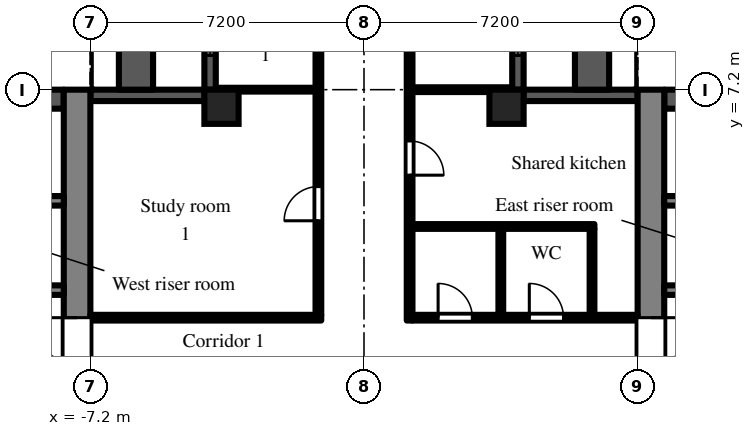
"""IFC4 building model, lengths in metres.
Left out: names, types, materials, properties, quantities, classifications, styles, units other than length and angle.
Written with IfcOpenShell. Run it as: python <this file> out.ifc"""

import sys

from ifc_helpers import new_model, si_unit, direction, frame, frame_2d, origin, origin_2d, place, context, subcontext, project, spatial, rectangle, extrude, element, fill, save


model = new_model("IFC4")
c1 = context("Model", 3, precision=1e-05, world=origin(), true_north=direction((0.0, 1.0)))
c2 = subcontext(c1, "Body", "Model", "MODEL_VIEW")
j1 = project(units=[si_unit("LENGTHUNIT", "METRE"), si_unit("PLANEANGLEUNIT", "RADIAN")], contexts=[c1])
p1 = place(None, origin())
s1 = spatial("IfcSite", under=j1, at=p1, CompositionType="ELEMENT")
p2 = place(p1, origin())
s2 = spatial("IfcBuilding", under=s1, at=p2, CompositionType="ELEMENT")
p3 = place(p2, frame((0.0, 0.0, 84.9)))
s3 = spatial("IfcBuildingStorey", under=s2, at=p3, CompositionType="ELEMENT", Elevation=84.9)
for number, where, z_axis, x_axis in (
    (1, (-3.75, 6.75, 0.0), (0.0, 0.0, 1.0), (1.0, 0.0, 0.0)),
    (2, (3.75, 6.75, 0.0), (0.0, 0.0, 1.0), (1.0, 0.0, 0.0)),
):
    element("IfcColumn", number, at=place(p3, frame(where, z_axis=z_axis, x_axis=x_axis)), inside=s3, PredefinedType="COLUMN", context=c2, shape_type="SweptSolid", body=[
        extrude(rectangle(XDim=0.9, YDim=0.9, at=origin_2d()), origin(), (0.0, 0.0, 1.0), 3.0),
    ])
p4 = place(p3, frame((7.2, 7.05, 0.0), z_axis=(0.0, 0.0, 1.0), x_axis=(-1.0, 0.0, 0.0)))
e3 = element("IfcWall", 3, at=p4, inside=s3, PredefinedType="SOLIDWALL", context=c2, shape_type="SweptSolid", body=[
    extrude(rectangle(XDim=3.0, YDim=0.3, at=frame_2d((1.5, 0.0))), origin(), (0.0, 0.0, 1.0), 2.1),
])
p5 = place(p3, frame((4.05, 7.2, 0.0), z_axis=(0.0, 0.0, 1.0), x_axis=(0.0, 1.0, 0.0)))
e4 = element("IfcWall", 4, at=p5, inside=s3, PredefinedType="SOLIDWALL", context=c2, shape_type="SweptSolid", body=[
    extrude(rectangle(XDim=7.2, YDim=0.3, at=frame_2d((3.6, 0.0))), origin(), (0.0, 0.0, 1.0), 2.1),
])
p6 = place(p5, frame((3.0, 0.0, 0.0)))
e5 = element("IfcOpeningElement", 5, at=p6, cuts=e4, PredefinedType="OPENING", context=c2, shape_type="SweptSolid", body=[
    extrude(rectangle(XDim=1.2, YDim=2.05, at=frame_2d((0.6, 1.025))), frame((0.0, 0.16, 0.0), z_axis=(0.0, -1.0, 0.0), x_axis=(1.0, 0.0, 0.0)), (0.0, 0.0, 1.0), 0.32),
])
p7 = place(p5, frame((0.9, 0.0, 0.2)))
e6 = element("IfcOpeningElement", 6, at=p7, cuts=e4, PredefinedType="OPENING", context=c2, shape_type="SweptSolid", body=[
    extrude(rectangle(XDim=1.8, YDim=1.85, at=frame_2d((0.9, 0.925))), frame((0.0, 0.16, 0.0), z_axis=(0.0, -1.0, 0.0), x_axis=(1.0, 0.0, 0.0)), (0.0, 0.0, 1.0), 0.32),
])
p8 = place(p5, frame((4.5, 0.0, 0.2)))
e7 = element("IfcOpeningElement", 7, at=p8, cuts=e4, PredefinedType="OPENING", context=c2, shape_type="SweptSolid", body=[
    extrude(rectangle(XDim=1.8, YDim=1.85, at=frame_2d((0.9, 0.925))), frame((0.0, 0.16, 0.0), z_axis=(0.0, -1.0, 0.0), x_axis=(1.0, 0.0, 0.0)), (0.0, 0.0, 1.0), 0.32),
])
p9 = place(p3, frame((-4.05, 14.4, 0.0), z_axis=(0.0, 0.0, 1.0), x_axis=(0.0, -1.0, 0.0)))
e8 = element("IfcWall", 8, at=p9, inside=s3, PredefinedType="SOLIDWALL", context=c2, shape_type="SweptSolid", body=[
    extrude(rectangle(XDim=7.2, YDim=0.3, at=frame_2d((3.6, 0.0))), origin(), (0.0, 0.0, 1.0), 2.1),
])
p10 = place(p9, frame((3.0, 0.0, 0.0)))
e9 = element("IfcOpeningElement", 9, at=p10, cuts=e8, PredefinedType="OPENING", context=c2, shape_type="SweptSolid", body=[
    extrude(rectangle(XDim=1.2, YDim=2.05, at=frame_2d((0.6, 1.025))), frame((0.0, 0.16, 0.0), z_axis=(0.0, -1.0, 0.0), x_axis=(1.0, 0.0, 0.0)), (0.0, 0.0, 1.0), 0.32),
])
p11 = place(p9, frame((0.9, 0.0, 0.2)))
e10 = element("IfcOpeningElement", 10, at=p11, cuts=e8, PredefinedType="OPENING", context=c2, shape_type="SweptSolid", body=[
    extrude(rectangle(XDim=1.8, YDim=1.85, at=frame_2d((0.9, 0.925))), frame((0.0, 0.16, 0.0), z_axis=(0.0, -1.0, 0.0), x_axis=(1.0, 0.0, 0.0)), (0.0, 0.0, 1.0), 0.32),
])
p12 = place(p9, frame((4.5, 0.0, 0.2)))
e11 = element("IfcOpeningElement", 11, at=p12, cuts=e8, PredefinedType="OPENING", context=c2, shape_type="SweptSolid", body=[
    extrude(rectangle(XDim=1.8, YDim=1.85, at=frame_2d((0.9, 0.925))), frame((0.0, 0.16, 0.0), z_axis=(0.0, -1.0, 0.0), x_axis=(1.0, 0.0, 0.0)), (0.0, 0.0, 1.0), 0.32),
])
p13 = place(p3, frame((-4.2, 7.05, 0.0), z_axis=(0.0, 0.0, 1.0), x_axis=(-1.0, 0.0, 0.0)))
e12 = element("IfcWall", 12, at=p13, inside=s3, PredefinedType="SOLIDWALL", context=c2, shape_type="SweptSolid", body=[
    extrude(rectangle(XDim=3.0, YDim=0.3, at=frame_2d((1.5, 0.0))), origin(), (0.0, 0.0, 1.0), 2.1),
])
for number, where, z_axis, x_axis in (
    (13, (6.0, 7.2, 0.0), (0.0, 0.0, 1.0), (0.0, 1.0, 0.0)),
    (14, (-6.0, 7.2, 0.0), (0.0, 0.0, 1.0), (0.0, 1.0, 0.0)),
):
    element("IfcWall", number, at=place(p3, frame(where, z_axis=z_axis, x_axis=x_axis)), inside=s3, PredefinedType="PARAPET", context=c2, shape_type="SweptSolid", body=[
        extrude(rectangle(XDim=7.2, YDim=0.9, at=frame_2d((3.6, 0.0))), origin(), (0.0, 0.0, 1.0), 0.8),
    ])
p14 = place(p3, frame((7.55, -7.2, 0.0), z_axis=(0.0, 0.0, 1.0), x_axis=(0.0, 1.0, 0.0)))
e15 = element("IfcWall", 15, at=p14, inside=s3, PredefinedType="SHEAR", context=c2, shape_type="SweptSolid", body=[
    extrude(rectangle(XDim=14.4, YDim=0.7, at=frame_2d((7.2, 0.0))), origin(), (0.0, 0.0, 1.0), 2.575),
])
p15 = place(p14, frame((6.0, 0.0, 0.0)))
e16 = element("IfcOpeningElement", 16, at=p15, cuts=e15, PredefinedType="OPENING", context=c2, shape_type="SweptSolid", body=[
    extrude(rectangle(XDim=2.4, YDim=2.2, at=frame_2d((1.2, 1.1))), frame((0.0, 0.36, 0.0), z_axis=(0.0, -1.0, 0.0), x_axis=(1.0, 0.0, 0.0)), (0.0, 0.0, 1.0), 0.72),
])
p16 = place(p3, frame((7.9, 6.95, 0.0), z_axis=(0.0, 0.0, 1.0), x_axis=(1.0, 0.0, 0.0)))
e17 = element("IfcWall", 17, at=p16, inside=s3, PredefinedType="SHEAR", context=c2, shape_type="SweptSolid", body=[
    extrude(rectangle(XDim=12.95, YDim=0.5, at=frame_2d((6.475, 0.0))), origin(), (0.0, 0.0, 1.0), 2.575),
])
p17 = place(p3, frame((7.9, 1.925, 0.0), z_axis=(0.0, 0.0, 1.0), x_axis=(1.0, 0.0, 0.0)))
e18 = element("IfcWall", 18, at=p17, inside=s3, PredefinedType="SHEAR", context=c2, shape_type="SweptSolid", body=[
    extrude(rectangle(XDim=12.95, YDim=0.25, at=frame_2d((6.475, 0.0))), origin(), (0.0, 0.0, 1.0), 2.575),
])
p18 = place(p17, frame((0.525, 0.0, 0.0)))
e19 = element("IfcOpeningElement", 19, at=p18, cuts=e18, PredefinedType="OPENING", context=c2, shape_type="SweptSolid", body=[
    extrude(rectangle(XDim=0.9, YDim=2.1, at=frame_2d((0.45, 1.05))), frame((0.0, 0.135, 0.0), z_axis=(0.0, -1.0, 0.0), x_axis=(1.0, 0.0, 0.0)), (0.0, 0.0, 1.0), 0.27),
])
p19 = place(p17, frame((2.625, 0.0, 0.0)))
e20 = element("IfcOpeningElement", 20, at=p19, cuts=e18, PredefinedType="OPENING", context=c2, shape_type="SweptSolid", body=[
    extrude(rectangle(XDim=1.1, YDim=2.1, at=frame_2d((0.55, 1.05))), frame((0.0, 0.135, 0.0), z_axis=(0.0, -1.0, 0.0), x_axis=(1.0, 0.0, 0.0)), (0.0, 0.0, 1.0), 0.27),
])
p20 = place(p17, frame((6.025, 0.0, 0.0)))
e21 = element("IfcOpeningElement", 21, at=p20, cuts=e18, PredefinedType="OPENING", context=c2, shape_type="SweptSolid", body=[
    extrude(rectangle(XDim=0.9, YDim=2.1, at=frame_2d((0.45, 1.05))), frame((0.0, 0.135, 0.0), z_axis=(0.0, -1.0, 0.0), x_axis=(1.0, 0.0, 0.0)), (0.0, 0.0, 1.0), 0.27),
])
p21 = place(p17, frame((9.325, 0.0, 0.0)))
e22 = element("IfcOpeningElement", 22, at=p21, cuts=e18, PredefinedType="OPENING", context=c2, shape_type="SweptSolid", body=[
    extrude(rectangle(XDim=0.9, YDim=2.1, at=frame_2d((0.45, 1.05))), frame((0.0, 0.135, 0.0), z_axis=(0.0, -1.0, 0.0), x_axis=(1.0, 0.0, 0.0)), (0.0, 0.0, 1.0), 0.27),
])
p22 = place(p3, frame((7.9, 4.275, 0.0), z_axis=(0.0, 0.0, 1.0), x_axis=(1.0, 0.0, 0.0)))
e23 = element("IfcWall", 23, at=p22, inside=s3, PredefinedType="SHEAR", context=c2, shape_type="SweptSolid", body=[
    extrude(rectangle(XDim=1.95, YDim=0.25, at=frame_2d((0.975, 0.0))), origin(), (0.0, 0.0, 1.0), 2.575),
])
p23 = place(p3, frame((-7.55, -7.2, 0.0), z_axis=(0.0, 0.0, 1.0), x_axis=(0.0, 1.0, 0.0)))
e24 = element("IfcWall", 24, at=p23, inside=s3, PredefinedType="SHEAR", context=c2, shape_type="SweptSolid", body=[
    extrude(rectangle(XDim=14.4, YDim=0.7, at=frame_2d((7.2, 0.0))), origin(), (0.0, 0.0, 1.0), 2.575),
])
p24 = place(p23, frame((6.0, 0.0, 0.0)))
e25 = element("IfcOpeningElement", 25, at=p24, cuts=e24, PredefinedType="OPENING", context=c2, shape_type="SweptSolid", body=[
    extrude(rectangle(XDim=2.4, YDim=2.2, at=frame_2d((1.2, 1.1))), frame((0.0, 0.36, 0.0), z_axis=(0.0, -1.0, 0.0), x_axis=(1.0, 0.0, 0.0)), (0.0, 0.0, 1.0), 0.72),
])
p25 = place(p3, frame((-7.9, 6.95, 0.0), z_axis=(0.0, 0.0, 1.0), x_axis=(-1.0, 0.0, 0.0)))
e26 = element("IfcWall", 26, at=p25, inside=s3, PredefinedType="SHEAR", context=c2, shape_type="SweptSolid", body=[
    extrude(rectangle(XDim=12.95, YDim=0.5, at=frame_2d((6.475, 0.0))), origin(), (0.0, 0.0, 1.0), 2.575),
])
p26 = place(p3, frame((-7.9, 1.925, 0.0), z_axis=(0.0, 0.0, 1.0), x_axis=(-1.0, 0.0, 0.0)))
e27 = element("IfcWall", 27, at=p26, inside=s3, PredefinedType="SHEAR", context=c2, shape_type="SweptSolid", body=[
    extrude(rectangle(XDim=12.95, YDim=0.25, at=frame_2d((6.475, 0.0))), origin(), (0.0, 0.0, 1.0), 2.575),
])
p27 = place(p26, frame((0.525, 0.0, 0.0)))
e28 = element("IfcOpeningElement", 28, at=p27, cuts=e27, PredefinedType="OPENING", context=c2, shape_type="SweptSolid", body=[
    extrude(rectangle(XDim=0.9, YDim=2.1, at=frame_2d((0.45, 1.05))), frame((0.0, 0.135, 0.0), z_axis=(0.0, -1.0, 0.0), x_axis=(1.0, 0.0, 0.0)), (0.0, 0.0, 1.0), 0.27),
])
p28 = place(p26, frame((2.625, 0.0, 0.0)))
e29 = element("IfcOpeningElement", 29, at=p28, cuts=e27, PredefinedType="OPENING", context=c2, shape_type="SweptSolid", body=[
    extrude(rectangle(XDim=1.1, YDim=2.1, at=frame_2d((0.55, 1.05))), frame((0.0, 0.135, 0.0), z_axis=(0.0, -1.0, 0.0), x_axis=(1.0, 0.0, 0.0)), (0.0, 0.0, 1.0), 0.27),
])
p29 = place(p26, frame((6.025, 0.0, 0.0)))
e30 = element("IfcOpeningElement", 30, at=p29, cuts=e27, PredefinedType="OPENING", context=c2, shape_type="SweptSolid", body=[
    extrude(rectangle(XDim=0.9, YDim=2.1, at=frame_2d((0.45, 1.05))), frame((0.0, 0.135, 0.0), z_axis=(0.0, -1.0, 0.0), x_axis=(1.0, 0.0, 0.0)), (0.0, 0.0, 1.0), 0.27),
])
p30 = place(p26, frame((9.325, 0.0, 0.0)))
e31 = element("IfcOpeningElement", 31, at=p30, cuts=e27, PredefinedType="OPENING", context=c2, shape_type="SweptSolid", body=[
    extrude(rectangle(XDim=0.9, YDim=2.1, at=frame_2d((0.45, 1.05))), frame((0.0, 0.135, 0.0), z_axis=(0.0, -1.0, 0.0), x_axis=(1.0, 0.0, 0.0)), (0.0, 0.0, 1.0), 0.27),
])
p31 = place(p3, frame((-7.9, 4.275, 0.0), z_axis=(0.0, 0.0, 1.0), x_axis=(-1.0, 0.0, 0.0)))
e32 = element("IfcWall", 32, at=p31, inside=s3, PredefinedType="SHEAR", context=c2, shape_type="SweptSolid", body=[
    extrude(rectangle(XDim=1.95, YDim=0.25, at=frame_2d((0.975, 0.0))), origin(), (0.0, 0.0, 1.0), 2.575),
])
p32 = place(p3, frame((-7.2, 1.2, 0.0), z_axis=(0.0, 0.0, 1.0), x_axis=(1.0, 0.0, 0.0)))
e33 = element("IfcWall", 33, at=p32, inside=s3, PredefinedType="PARTITIONING", context=c2, shape_type="SweptSolid", body=[
    extrude(rectangle(XDim=6.075, YDim=0.15, at=frame_2d((3.038, 0.0))), origin(), (0.0, 0.0, 1.0), 2.575),
])
p33 = place(p3, frame((-3.9, 7.2, 0.0), z_axis=(0.0, 0.0, 1.0), x_axis=(1.0, 0.0, 0.0)))
e34 = element("IfcWall", 34, at=p33, inside=s3, PredefinedType="PARTITIONING", context=c2, shape_type="SweptSolid", body=[
    extrude(rectangle(XDim=2.625, YDim=0.1, at=frame_2d((1.312, 0.0))), origin(), (0.0, 0.0, 1.0), 2.575),
])
p34 = place(p3, frame((-1.2, 1.275, 0.0), z_axis=(0.0, 0.0, 1.0), x_axis=(0.0, 1.0, 0.0)))
e35 = element("IfcWall", 35, at=p34, inside=s3, PredefinedType="PARTITIONING", context=c2, shape_type="SweptSolid", body=[
    extrude(rectangle(XDim=16.65, YDim=0.15, at=frame_2d((8.325, 0.0))), origin(), (0.0, 0.0, 1.0), 2.575),
])
p35 = place(p34, frame((2.475, 0.0, 0.0)))
e36 = element("IfcOpeningElement", 36, at=p35, cuts=e35, PredefinedType="OPENING", context=c2, shape_type="SweptSolid", body=[
    extrude(rectangle(XDim=0.9, YDim=2.1, at=frame_2d((0.45, 1.05))), frame((0.0, 0.085, 0.0), z_axis=(0.0, -1.0, 0.0), x_axis=(1.0, 0.0, 0.0)), (0.0, 0.0, 1.0), 0.17),
])
p36 = place(p34, frame((10.875, 0.0, 0.0)))
e37 = element("IfcOpeningElement", 37, at=p36, cuts=e35, PredefinedType="OPENING", context=c2, shape_type="SweptSolid", body=[
    extrude(rectangle(XDim=0.9, YDim=2.1, at=frame_2d((0.45, 1.05))), frame((0.0, 0.085, 0.0), z_axis=(0.0, -1.0, 0.0), x_axis=(1.0, 0.0, 0.0)), (0.0, 0.0, 1.0), 0.17),
])
p37 = place(p34, frame((14.025, 0.0, 0.0)))
e38 = element("IfcOpeningElement", 38, at=p37, cuts=e35, PredefinedType="OPENING", context=c2, shape_type="SweptSolid", body=[
    extrude(rectangle(XDim=1.8, YDim=2.1, at=frame_2d((0.9, 1.05))), frame((0.0, 0.085, 0.0), z_axis=(0.0, -1.0, 0.0), x_axis=(1.0, 0.0, 0.0)), (0.0, 0.0, 1.0), 0.17),
])
p38 = place(p3, frame((1.2, 1.125, 0.0), z_axis=(0.0, 0.0, 1.0), x_axis=(0.0, 1.0, 0.0)))
e39 = element("IfcWall", 39, at=p38, inside=s3, PredefinedType="PARTITIONING", context=c2, shape_type="SweptSolid", body=[
    extrude(rectangle(XDim=16.8, YDim=0.15, at=frame_2d((8.4, 0.0))), origin(), (0.0, 0.0, 1.0), 2.575),
])
p39 = place(p38, frame((3.825, 0.0, 0.0)))
e40 = element("IfcOpeningElement", 40, at=p39, cuts=e39, PredefinedType="OPENING", context=c2, shape_type="SweptSolid", body=[
    extrude(rectangle(XDim=0.9, YDim=2.1, at=frame_2d((0.45, 1.05))), frame((0.0, 0.085, 0.0), z_axis=(0.0, -1.0, 0.0), x_axis=(1.0, 0.0, 0.0)), (0.0, 0.0, 1.0), 0.17),
])
p40 = place(p38, frame((7.425, 0.0, 0.0)))
e41 = element("IfcOpeningElement", 41, at=p40, cuts=e39, PredefinedType="OPENING", context=c2, shape_type="SweptSolid", body=[
    extrude(rectangle(XDim=0.9, YDim=2.1, at=frame_2d((0.45, 1.05))), frame((0.0, 0.085, 0.0), z_axis=(0.0, -1.0, 0.0), x_axis=(1.0, 0.0, 0.0)), (0.0, 0.0, 1.0), 0.17),
])
p41 = place(p38, frame((13.475, 0.0, 0.0)))
e42 = element("IfcOpeningElement", 42, at=p41, cuts=e39, PredefinedType="OPENING", context=c2, shape_type="SweptSolid", body=[
    extrude(rectangle(XDim=1.0, YDim=2.1, at=frame_2d((0.5, 1.05))), frame((0.0, 0.085, 0.0), z_axis=(0.0, -1.0, 0.0), x_axis=(1.0, 0.0, 0.0)), (0.0, 0.0, 1.0), 0.17),
])
p42 = place(p3, frame((1.275, 1.2, 0.0), z_axis=(0.0, 0.0, 1.0), x_axis=(1.0, 0.0, 0.0)))
e43 = element("IfcWall", 43, at=p42, inside=s3, PredefinedType="PARTITIONING", context=c2, shape_type="SweptSolid", body=[
    extrude(rectangle(XDim=5.925, YDim=0.15, at=frame_2d((2.962, 0.0))), origin(), (0.0, 0.0, 1.0), 2.575),
])
p43 = place(p42, frame((0.675, 0.0, 0.0)))
e44 = element("IfcOpeningElement", 44, at=p43, cuts=e43, PredefinedType="OPENING", context=c2, shape_type="SweptSolid", body=[
    extrude(rectangle(XDim=0.9, YDim=2.1, at=frame_2d((0.45, 1.05))), frame((0.0, 0.085, 0.0), z_axis=(0.0, -1.0, 0.0), x_axis=(1.0, 0.0, 0.0)), (0.0, 0.0, 1.0), 0.17),
])
p44 = place(p42, frame((3.075, 0.0, 0.0)))
e45 = element("IfcOpeningElement", 45, at=p44, cuts=e43, PredefinedType="OPENING", context=c2, shape_type="SweptSolid", body=[
    extrude(rectangle(XDim=0.9, YDim=2.1, at=frame_2d((0.45, 1.05))), frame((0.0, 0.085, 0.0), z_axis=(0.0, -1.0, 0.0), x_axis=(1.0, 0.0, 0.0)), (0.0, 0.0, 1.0), 0.17),
])
p45 = place(p3, frame((1.275, 3.6, 0.0), z_axis=(0.0, 0.0, 1.0), x_axis=(1.0, 0.0, 0.0)))
e46 = element("IfcWall", 46, at=p45, inside=s3, PredefinedType="PARTITIONING", context=c2, shape_type="SweptSolid", body=[
    extrude(rectangle(XDim=4.788, YDim=0.125, at=frame_2d((2.394, 0.0))), origin(), (0.0, 0.0, 1.0), 2.575),
])
p46 = place(p3, frame((1.275, 7.2, 0.0), z_axis=(0.0, 0.0, 1.0), x_axis=(1.0, 0.0, 0.0)))
e47 = element("IfcWall", 47, at=p46, inside=s3, PredefinedType="PARTITIONING", context=c2, shape_type="SweptSolid", body=[
    extrude(rectangle(XDim=2.625, YDim=0.125, at=frame_2d((1.312, 0.0))), origin(), (0.0, 0.0, 1.0), 2.575),
])
for number, where, z_axis, x_axis in (
    (48, (3.6, 1.275, 0.0), (0.0, 0.0, 1.0), (0.0, 1.0, 0.0)),
    (49, (6.0, 1.275, 0.0), (0.0, 0.0, 1.0), (0.0, 1.0, 0.0)),
):
    element("IfcWall", number, at=place(p3, frame(where, z_axis=z_axis, x_axis=x_axis)), inside=s3, PredefinedType="PARTITIONING", context=c2, shape_type="SweptSolid", body=[
        extrude(rectangle(XDim=2.263, YDim=0.125, at=frame_2d((1.131, 0.0))), origin(), (0.0, 0.0, 1.0), 2.575),
    ])
p47 = place(p7, origin())
e50 = element("IfcWindow", 50, at=p47, inside=s3, PartitioningType="SINGLE_PANEL", PredefinedType="WINDOW", context=c2, shape_type="SweptSolid", body=[
    extrude(rectangle(XDim=1.8, YDim=1.85, at=frame_2d((0.9, 0.925))), frame((0.0, 0.03, 0.0), z_axis=(0.0, -1.0, 0.0), x_axis=(1.0, 0.0, 0.0)), (0.0, 0.0, 1.0), 0.06),
])
fill(e6, e50)
p48 = place(p12, origin())
e51 = element("IfcWindow", 51, at=p48, inside=s3, PartitioningType="SINGLE_PANEL", PredefinedType="WINDOW", context=c2, shape_type="SweptSolid", body=[
    extrude(rectangle(XDim=1.8, YDim=1.85, at=frame_2d((0.9, 0.925))), frame((0.0, 0.03, 0.0), z_axis=(0.0, -1.0, 0.0), x_axis=(1.0, 0.0, 0.0)), (0.0, 0.0, 1.0), 0.06),
])
fill(e11, e51)
p49 = place(p15, frame((2.4, 0.0, 0.0), z_axis=(0.0, 0.0, 1.0), x_axis=(-1.0, 0.0, 0.0)))
e52 = element("IfcDoor", 52, at=p49, inside=s3, OperationType="DOUBLE_DOOR_DOUBLE_SWING", PredefinedType="DOOR", context=c2, shape_type="SweptSolid", body=[
    extrude(rectangle(XDim=2.4, YDim=2.2, at=frame_2d((1.2, 1.1))), frame((0.0, 0.025, 0.0), z_axis=(0.0, -1.0, 0.0), x_axis=(1.0, 0.0, 0.0)), (0.0, 0.0, 1.0), 0.05),
])
fill(e16, e52)
p50 = place(p24, origin())
e53 = element("IfcDoor", 53, at=p50, inside=s3, OperationType="DOUBLE_DOOR_DOUBLE_SWING", PredefinedType="DOOR", context=c2, shape_type="SweptSolid", body=[
    extrude(rectangle(XDim=2.4, YDim=2.2, at=frame_2d((1.2, 1.1))), frame((0.0, 0.025, 0.0), z_axis=(0.0, -1.0, 0.0), x_axis=(1.0, 0.0, 0.0)), (0.0, 0.0, 1.0), 0.05),
])
fill(e25, e53)
p51 = place(p43, origin())
e54 = element("IfcDoor", 54, at=p51, inside=s3, OperationType="SINGLE_SWING_LEFT", PredefinedType="DOOR", context=c2, shape_type="SweptSolid", body=[
    extrude(rectangle(XDim=0.9, YDim=2.1, at=frame_2d((0.45, 1.05))), frame((0.0, 0.025, 0.0), z_axis=(0.0, -1.0, 0.0), x_axis=(1.0, 0.0, 0.0)), (0.0, 0.0, 1.0), 0.05),
])
fill(e44, e54)
p52 = place(p44, origin())
e55 = element("IfcDoor", 55, at=p52, inside=s3, OperationType="SINGLE_SWING_LEFT", PredefinedType="DOOR", context=c2, shape_type="SweptSolid", body=[
    extrude(rectangle(XDim=0.9, YDim=2.1, at=frame_2d((0.45, 1.05))), frame((0.0, 0.025, 0.0), z_axis=(0.0, -1.0, 0.0), x_axis=(1.0, 0.0, 0.0)), (0.0, 0.0, 1.0), 0.05),
])
fill(e45, e55)
p53 = place(p39, frame((0.9, 0.0, 0.0), z_axis=(0.0, 0.0, 1.0), x_axis=(-1.0, 0.0, 0.0)))
e56 = element("IfcDoor", 56, at=p53, inside=s3, OperationType="SINGLE_SWING_RIGHT", PredefinedType="DOOR", context=c2, shape_type="SweptSolid", body=[
    extrude(rectangle(XDim=0.9, YDim=2.1, at=frame_2d((0.45, 1.05))), frame((0.0, 0.025, 0.0), z_axis=(0.0, -1.0, 0.0), x_axis=(1.0, 0.0, 0.0)), (0.0, 0.0, 1.0), 0.05),
])
fill(e40, e56)
p54 = place(p35, origin())
e57 = element("IfcDoor", 57, at=p54, inside=s3, OperationType="SINGLE_SWING_LEFT", PredefinedType="DOOR", context=c2, shape_type="SweptSolid", body=[
    extrude(rectangle(XDim=0.9, YDim=2.1, at=frame_2d((0.45, 1.05))), frame((0.0, 0.025, 0.0), z_axis=(0.0, -1.0, 0.0), x_axis=(1.0, 0.0, 0.0)), (0.0, 0.0, 1.0), 0.05),
])
fill(e36, e57)
save(model, sys.argv[1])
